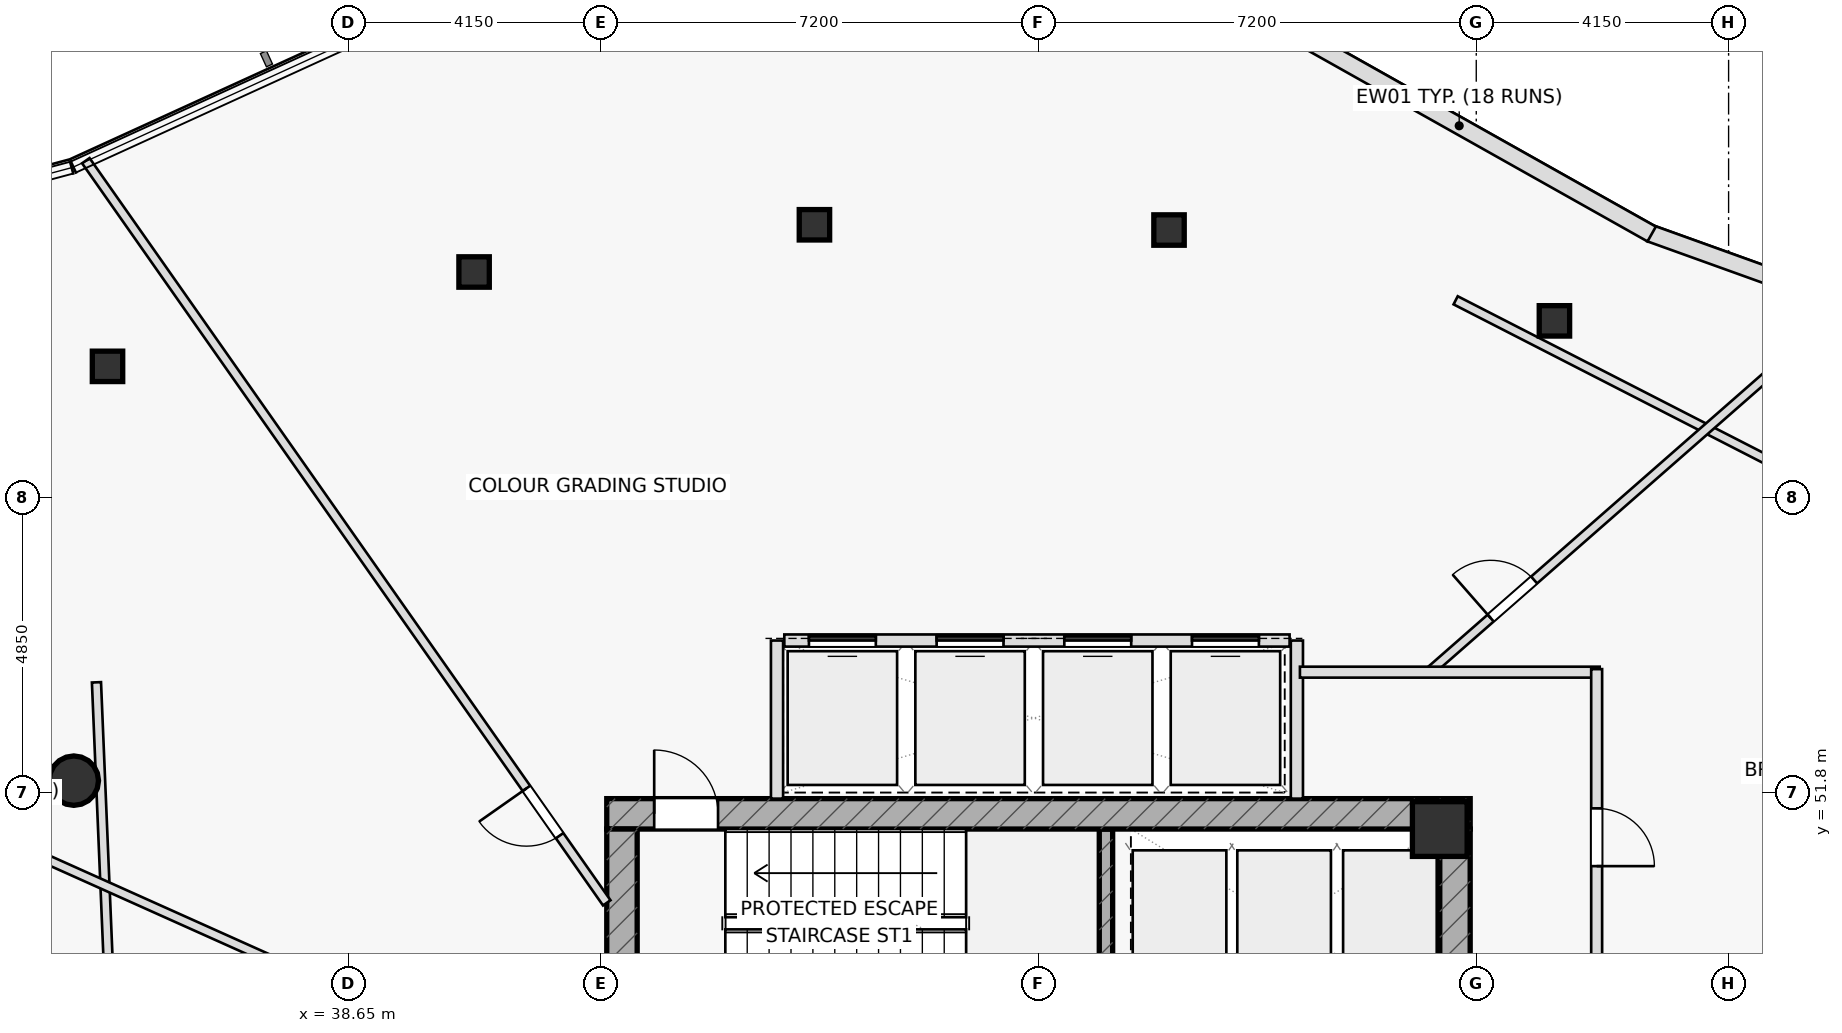
"""IFC4 building model, lengths in metres.
Left out: names, types, materials, properties, quantities, classifications, styles, units other than length and angle.
Written with IfcOpenShell. Run it as: python <this file> out.ifc"""

import sys

from ifc_helpers import new_model, si_unit, direction, frame, frame_2d, origin, origin_2d, place, context, subcontext, project, spatial, rectangle, hollow_rectangle, hollow_circle, extrude, element, fill, save


model = new_model("IFC4")
c1 = context("Model", 3, precision=1e-05, world=origin(), true_north=direction((0.0, 1.0)))
c2 = subcontext(c1, "Body", "Model", "MODEL_VIEW")
j1 = project(units=[si_unit("LENGTHUNIT", "METRE"), si_unit("PLANEANGLEUNIT", "RADIAN")], contexts=[c1])
p1 = place(None, origin())
s1 = spatial("IfcSite", under=j1, at=p1, CompositionType="ELEMENT")
p2 = place(p1, origin())
s2 = spatial("IfcBuilding", under=s1, at=p2, CompositionType="ELEMENT")
p3 = place(p2, frame((0.0, 0.0, 285.5)))
s3 = spatial("IfcBuildingStorey", under=s2, at=p3, CompositionType="ELEMENT", Elevation=285.5)
p4 = place(p3, frame((51.11, 48.1, 0.0), z_axis=(0.0, 0.0, 1.0), x_axis=(0.0, 1.0, 0.0)))
e1 = element("IfcWall", 1, at=p4, inside=s3, PredefinedType="SHEAR", context=c2, shape_type="SweptSolid", body=[
    extrude(rectangle(XDim=3.1, YDim=0.22, at=frame_2d((1.55, 0.0))), origin(), (0.0, 0.0, 1.0), 3.7),
])
p5 = place(p3, frame((42.9, 51.45, 0.0), z_axis=(0.0, 0.0, 1.0), x_axis=(1.0, 0.0, 0.0)))
e2 = element("IfcWall", 2, at=p5, inside=s3, PredefinedType="SHEAR", context=c2, shape_type="SweptSolid", body=[
    extrude(rectangle(XDim=14.2, YDim=0.5, at=frame_2d((7.1, 0.0))), origin(), (0.0, 0.0, 1.0), 3.7),
])
p6 = place(p5, frame((0.78, 0.0, 0.0)))
e3 = element("IfcOpeningElement", 3, at=p6, cuts=e2, PredefinedType="OPENING", context=c2, shape_type="SweptSolid", body=[
    extrude(rectangle(XDim=1.05, YDim=2.2, at=frame_2d((0.525, 1.1))), frame((0.0, 0.26, 0.0), z_axis=(0.0, -1.0, 0.0), x_axis=(1.0, 0.0, 0.0)), (0.0, 0.0, 1.0), 0.52),
])
p7 = place(p3, frame((43.15, 38.8, 0.0), z_axis=(0.0, 0.0, 1.0), x_axis=(0.0, 1.0, 0.0)))
e4 = element("IfcWall", 4, at=p7, inside=s3, PredefinedType="SHEAR", context=c2, shape_type="SweptSolid", body=[
    extrude(rectangle(XDim=12.4, YDim=0.5, at=frame_2d((6.2, 0.0))), origin(), (0.0, 0.0, 1.0), 3.7),
])
p8 = place(p3, frame((56.85, 38.8, 0.0), z_axis=(0.0, 0.0, 1.0), x_axis=(0.0, 1.0, 0.0)))
e5 = element("IfcWall", 5, at=p8, inside=s3, PredefinedType="SHEAR", context=c2, shape_type="SweptSolid", body=[
    extrude(rectangle(XDim=12.4, YDim=0.5, at=frame_2d((6.2, 0.0))), origin(), (0.0, 0.0, 1.0), 3.7),
])
p9 = place(p8, frame((3.85, 0.0, 0.0)))
e6 = element("IfcOpeningElement", 6, at=p9, cuts=e5, PredefinedType="OPENING", context=c2, shape_type="SweptSolid", body=[
    extrude(rectangle(XDim=1.5, YDim=2.2, at=frame_2d((0.75, 1.1))), frame((0.0, 0.26, 0.0), z_axis=(0.0, -1.0, 0.0), x_axis=(1.0, 0.0, 0.0)), (0.0, 0.0, 1.0), 0.52),
])
p10 = place(p3, frame((56.6, 51.2, 0.0), z_axis=(0.0, 0.0, 1.0), x_axis=(1.0, 0.0, 0.0)))
e7 = element("IfcColumn", 7, at=p10, inside=s3, PredefinedType="COLUMN", context=c2, shape_type="SweptSolid", body=[
    extrude(rectangle(XDim=0.9, YDim=0.9, at=origin_2d()), origin(), (0.0, 0.0, 1.0), 3.7),
])
p11 = place(p3, frame((34.135, 51.996, 0.0), z_axis=(0.0, 0.0, 1.0), x_axis=(1.0, 0.0, 0.0)))
e8 = element("IfcColumn", 8, at=p11, inside=s3, PredefinedType="COLUMN", context=c2, shape_type="SweptSolid", body=[
    extrude(hollow_circle(Radius=0.406, WallThickness=0.036, at=origin_2d()), origin(), (0.0, 0.0, 1.0), 3.7),
])
for number, where, z_axis, x_axis in (
    (9, (58.486, 59.557, 0.0), (0.0, 0.0, 1.0), (1.0, 0.0, 0.0)),
    (10, (52.147, 61.051, 0.0), (0.0, 0.0, 1.0), (1.0, 0.0, 0.0)),
    (11, (46.315, 61.137, 0.0), (0.0, 0.0, 1.0), (1.0, 0.0, 0.0)),
    (12, (40.718, 60.361, 0.0), (0.0, 0.0, 1.0), (1.0, 0.0, 0.0)),
    (13, (34.689, 58.809, 0.0), (0.0, 0.0, 1.0), (1.0, 0.0, 0.0)),
):
    element("IfcColumn", number, at=place(p3, frame(where, z_axis=z_axis, x_axis=x_axis)), inside=s3, PredefinedType="COLUMN", context=c2, shape_type="SweptSolid", body=[
        extrude(hollow_rectangle(XDim=0.5, YDim=0.5, WallThickness=0.03, at=origin_2d()), origin(), (0.0, 0.0, 1.0), 3.7),
    ])
for number, where, z_axis, x_axis in (
    (14, (45.7, 51.7, 0.0), (0.0, 0.0, 1.0), (0.0, 1.0, 0.0)),
    (15, (54.25, 51.7, 0.0), (0.0, 0.0, 1.0), (0.0, 1.0, 0.0)),
):
    element("IfcWall", number, at=place(p3, frame(where, z_axis=z_axis, x_axis=x_axis)), inside=s3, PredefinedType="PARTITIONING", context=c2, shape_type="SweptSolid", body=[
        extrude(rectangle(XDim=2.6, YDim=0.2, at=frame_2d((1.3, 0.0))), origin(), (0.0, 0.0, 1.0), 3.7),
    ])
p12 = place(p3, frame((34.507, 53.613, 0.0), z_axis=(0.0, 0.0, 1.0), x_axis=(0.041875090182, -0.999122853718, 0.0)))
e16 = element("IfcWall", 16, at=p12, inside=s3, PredefinedType="PARTITIONING", context=c2, shape_type="SweptSolid", body=[
    extrude(rectangle(XDim=8.139, YDim=0.15, at=frame_2d((4.069, 0.0))), origin(), (0.0, 0.0, 1.0), 3.235),
])
p13 = place(p3, frame((66.543, 54.934, 0.0), z_axis=(0.0, 0.0, 1.0), x_axis=(-0.889966951661, 0.456025026673, 0.0)))
e17 = element("IfcWall", 17, at=p13, inside=s3, PredefinedType="PARTITIONING", context=c2, shape_type="SweptSolid", body=[
    extrude(rectangle(XDim=10.879, YDim=0.15, at=frame_2d((5.439, 0.0))), origin(), (0.0, 0.0, 1.0), 3.235),
])
p14 = place(p3, frame((56.422, 53.78, 0.0), z_axis=(0.0, 0.0, 1.0), x_axis=(0.752182981844, 0.658954294184, 0.0)))
e18 = element("IfcWall", 18, at=p14, inside=s3, PredefinedType="PARTITIONING", context=c2, shape_type="SweptSolid", body=[
    extrude(rectangle(XDim=9.184, YDim=0.15, at=frame_2d((4.592, 0.0))), origin(), (0.0, 0.0, 1.0), 3.175),
])
p15 = place(p14, frame((1.35, 0.0, 0.0)))
e19 = element("IfcOpeningElement", 19, at=p15, cuts=e18, PredefinedType="OPENING", context=c2, shape_type="SweptSolid", body=[
    extrude(rectangle(XDim=0.95, YDim=2.05, at=frame_2d((0.475, 1.025))), frame((0.0, 0.085, 0.0), z_axis=(0.0, -1.0, 0.0), x_axis=(1.0, 0.0, 0.0)), (0.0, 0.0, 1.0), 0.17),
])
p16 = place(p3, frame((42.9, 49.986, 0.0), z_axis=(0.0, 0.0, 1.0), x_axis=(-0.574534288992, 0.818480513373, 0.0)))
e20 = element("IfcWall", 20, at=p16, inside=s3, PredefinedType="PARTITIONING", context=c2, shape_type="SweptSolid", body=[
    extrude(rectangle(XDim=14.912, YDim=0.15, at=frame_2d((7.456, 0.0))), origin(), (0.0, 0.0, 1.0), 3.175),
])
p17 = place(p16, frame((1.35, 0.0, 0.0)))
e21 = element("IfcOpeningElement", 21, at=p17, cuts=e20, PredefinedType="OPENING", context=c2, shape_type="SweptSolid", body=[
    extrude(rectangle(XDim=0.95, YDim=2.05, at=frame_2d((0.475, 1.025))), frame((0.0, 0.085, 0.0), z_axis=(0.0, -1.0, 0.0), x_axis=(1.0, 0.0, 0.0)), (0.0, 0.0, 1.0), 0.17),
])
p18 = place(p3, frame((39.846, 47.94, 0.0), z_axis=(0.0, 0.0, 1.0), x_axis=(-0.912400712577, 0.409298106139, 0.0)))
e22 = element("IfcWall", 22, at=p18, inside=s3, PredefinedType="PARTITIONING", context=c2, shape_type="SweptSolid", body=[
    extrude(rectangle(XDim=16.67, YDim=0.15, at=frame_2d((8.335, 0.0))), origin(), (0.0, 0.0, 1.0), 3.175),
])
p19 = place(p18, frame((1.35, 0.0, 0.0)))
e23 = element("IfcOpeningElement", 23, at=p19, cuts=e22, PredefinedType="OPENING", context=c2, shape_type="SweptSolid", body=[
    extrude(rectangle(XDim=0.95, YDim=2.05, at=frame_2d((0.475, 1.025))), frame((0.0, 0.085, 0.0), z_axis=(0.0, -1.0, 0.0), x_axis=(1.0, 0.0, 0.0)), (0.0, 0.0, 1.0), 0.17),
])
p20 = place(p3, frame((54.3, 53.78, 0.0), z_axis=(0.0, 0.0, 1.0), x_axis=(1.0, 0.0, 0.0)))
e24 = element("IfcWall", 24, at=p20, inside=s3, PredefinedType="PARTITIONING", context=c2, shape_type="SweptSolid", body=[
    extrude(rectangle(XDim=4.93, YDim=0.18, at=frame_2d((2.465, 0.0))), origin(), (0.0, 0.0, 1.0), 3.7),
])
p21 = place(p3, frame((59.18, 53.83, 0.0), z_axis=(0.0, 0.0, 1.0), x_axis=(0.0, -1.0, 0.0)))
e25 = element("IfcWall", 25, at=p21, inside=s3, PredefinedType="PARTITIONING", context=c2, shape_type="SweptSolid", body=[
    extrude(rectangle(XDim=5.53, YDim=0.18, at=frame_2d((2.765, 0.0))), origin(), (0.0, 0.0, 1.0), 3.7),
])
p22 = place(p21, frame((2.29, 0.0, 0.0)))
e26 = element("IfcOpeningElement", 26, at=p22, cuts=e25, PredefinedType="OPENING", context=c2, shape_type="SweptSolid", body=[
    extrude(rectangle(XDim=0.95, YDim=2.05, at=frame_2d((0.475, 1.025))), frame((0.0, 0.1, 0.0), z_axis=(0.0, -1.0, 0.0), x_axis=(1.0, 0.0, 0.0)), (0.0, 0.0, 1.0), 0.2),
])
p23 = place(p3, frame((66.284, 58.759, 0.0), z_axis=(0.0, 0.0, 1.0), x_axis=(-0.94102093615, 0.338348337852, 0.0)))
e27 = element("IfcWall", 27, at=p23, inside=s3, PredefinedType="STANDARD", context=c2, shape_type="SweptSolid", body=[
    extrude(rectangle(XDim=6.616, YDim=0.28, at=frame_2d((3.308, 0.0))), origin(), (0.0, 0.0, 1.0), 3.7),
])
p24 = place(p3, frame((60.085, 60.985, 0.0), z_axis=(0.0, 0.0, 1.0), x_axis=(-0.871645541065, 0.490136767384, 0.0)))
e28 = element("IfcWall", 28, at=p24, inside=s3, PredefinedType="STANDARD", context=c2, shape_type="SweptSolid", body=[
    extrude(rectangle(XDim=7.264, YDim=0.28, at=frame_2d((3.632, 0.0))), origin(), (0.0, 0.0, 1.0), 3.7),
])
p25 = place(p3, frame((45.82, 54.3, 0.0), z_axis=(0.0, 0.0, 1.0), x_axis=(1.0, 0.0, 0.0)))
e29 = element("IfcWall", 29, at=p25, inside=s3, PredefinedType="PARTITIONING", context=c2, shape_type="SweptSolid", body=[
    extrude(rectangle(XDim=8.31, YDim=0.2, at=frame_2d((4.155, 0.0))), origin(), (0.0, 0.0, 1.0), 3.7),
])
p26 = place(p25, frame((0.405, 0.0, 0.0)))
e30 = element("IfcOpeningElement", 30, at=p26, cuts=e29, PredefinedType="OPENING", context=c2, shape_type="SweptSolid", body=[
    extrude(rectangle(XDim=1.1, YDim=2.15, at=frame_2d((0.55, 1.075))), frame((0.0, 0.11, 0.0), z_axis=(0.0, -1.0, 0.0), x_axis=(1.0, 0.0, 0.0)), (0.0, 0.0, 1.0), 0.22),
])
p27 = place(p25, frame((2.505, 0.0, 0.0)))
e31 = element("IfcOpeningElement", 31, at=p27, cuts=e29, PredefinedType="OPENING", context=c2, shape_type="SweptSolid", body=[
    extrude(rectangle(XDim=1.1, YDim=2.15, at=frame_2d((0.55, 1.075))), frame((0.0, 0.11, 0.0), z_axis=(0.0, -1.0, 0.0), x_axis=(1.0, 0.0, 0.0)), (0.0, 0.0, 1.0), 0.22),
])
p28 = place(p25, frame((4.605, 0.0, 0.0)))
e32 = element("IfcOpeningElement", 32, at=p28, cuts=e29, PredefinedType="OPENING", context=c2, shape_type="SweptSolid", body=[
    extrude(rectangle(XDim=1.1, YDim=2.15, at=frame_2d((0.55, 1.075))), frame((0.0, 0.11, 0.0), z_axis=(0.0, -1.0, 0.0), x_axis=(1.0, 0.0, 0.0)), (0.0, 0.0, 1.0), 0.22),
])
p29 = place(p25, frame((6.705, 0.0, 0.0)))
e33 = element("IfcOpeningElement", 33, at=p29, cuts=e29, PredefinedType="OPENING", context=c2, shape_type="SweptSolid", body=[
    extrude(rectangle(XDim=1.1, YDim=2.15, at=frame_2d((0.55, 1.075))), frame((0.0, 0.11, 0.0), z_axis=(0.0, -1.0, 0.0), x_axis=(1.0, 0.0, 0.0)), (0.0, 0.0, 1.0), 0.22),
])
p30 = place(p6, origin())
e34 = element("IfcDoor", 34, at=p30, inside=s3, OperationType="SINGLE_SWING_LEFT", PredefinedType="DOOR", context=c2, shape_type="SweptSolid", body=[
    extrude(rectangle(XDim=1.05, YDim=2.2, at=frame_2d((0.525, 1.1))), frame((0.0, 0.025, 0.0), z_axis=(0.0, -1.0, 0.0), x_axis=(1.0, 0.0, 0.0)), (0.0, 0.0, 1.0), 0.05),
])
fill(e3, e34)
p31 = place(p15, origin())
e35 = element("IfcDoor", 35, at=p31, inside=s3, OperationType="SINGLE_SWING_LEFT", PredefinedType="DOOR", context=c2, shape_type="SweptSolid", body=[
    extrude(rectangle(XDim=0.95, YDim=2.05, at=frame_2d((0.475, 1.025))), frame((0.0, 0.025, 0.0), z_axis=(0.0, -1.0, 0.0), x_axis=(1.0, 0.0, 0.0)), (0.0, 0.0, 1.0), 0.05),
])
fill(e19, e35)
p32 = place(p17, origin())
e36 = element("IfcDoor", 36, at=p32, inside=s3, OperationType="SINGLE_SWING_RIGHT", PredefinedType="DOOR", context=c2, shape_type="SweptSolid", body=[
    extrude(rectangle(XDim=0.95, YDim=2.05, at=frame_2d((0.475, 1.025))), frame((0.0, 0.025, 0.0), z_axis=(0.0, -1.0, 0.0), x_axis=(1.0, 0.0, 0.0)), (0.0, 0.0, 1.0), 0.05),
])
fill(e21, e36)
p33 = place(p22, origin())
e37 = element("IfcDoor", 37, at=p33, inside=s3, OperationType="SINGLE_SWING_RIGHT", PredefinedType="DOOR", context=c2, shape_type="SweptSolid", body=[
    extrude(rectangle(XDim=0.95, YDim=2.05, at=frame_2d((0.475, 1.025))), frame((0.0, 0.025, 0.0), z_axis=(0.0, -1.0, 0.0), x_axis=(1.0, 0.0, 0.0)), (0.0, 0.0, 1.0), 0.05),
])
fill(e26, e37)
p34 = place(p26, origin())
e38 = element("IfcDoor", 38, at=p34, inside=s3, OperationType="SLIDING_TO_LEFT", PredefinedType="DOOR", context=c2, shape_type="SweptSolid", body=[
    extrude(rectangle(XDim=1.1, YDim=2.15, at=frame_2d((0.55, 1.075))), frame((0.0, 0.025, 0.0), z_axis=(0.0, -1.0, 0.0), x_axis=(1.0, 0.0, 0.0)), (0.0, 0.0, 1.0), 0.05),
])
fill(e30, e38)
p35 = place(p27, origin())
e39 = element("IfcDoor", 39, at=p35, inside=s3, OperationType="SLIDING_TO_RIGHT", PredefinedType="DOOR", context=c2, shape_type="SweptSolid", body=[
    extrude(rectangle(XDim=1.1, YDim=2.15, at=frame_2d((0.55, 1.075))), frame((0.0, 0.025, 0.0), z_axis=(0.0, -1.0, 0.0), x_axis=(1.0, 0.0, 0.0)), (0.0, 0.0, 1.0), 0.05),
])
fill(e31, e39)
p36 = place(p28, origin())
e40 = element("IfcDoor", 40, at=p36, inside=s3, OperationType="SLIDING_TO_LEFT", PredefinedType="DOOR", context=c2, shape_type="SweptSolid", body=[
    extrude(rectangle(XDim=1.1, YDim=2.15, at=frame_2d((0.55, 1.075))), frame((0.0, 0.025, 0.0), z_axis=(0.0, -1.0, 0.0), x_axis=(1.0, 0.0, 0.0)), (0.0, 0.0, 1.0), 0.05),
])
fill(e32, e40)
p37 = place(p29, origin())
e41 = element("IfcDoor", 41, at=p37, inside=s3, OperationType="SLIDING_TO_RIGHT", PredefinedType="DOOR", context=c2, shape_type="SweptSolid", body=[
    extrude(rectangle(XDim=1.1, YDim=2.15, at=frame_2d((0.55, 1.075))), frame((0.0, 0.025, 0.0), z_axis=(0.0, -1.0, 0.0), x_axis=(1.0, 0.0, 0.0)), (0.0, 0.0, 1.0), 0.05),
])
fill(e33, e41)
save(model, sys.argv[1])
